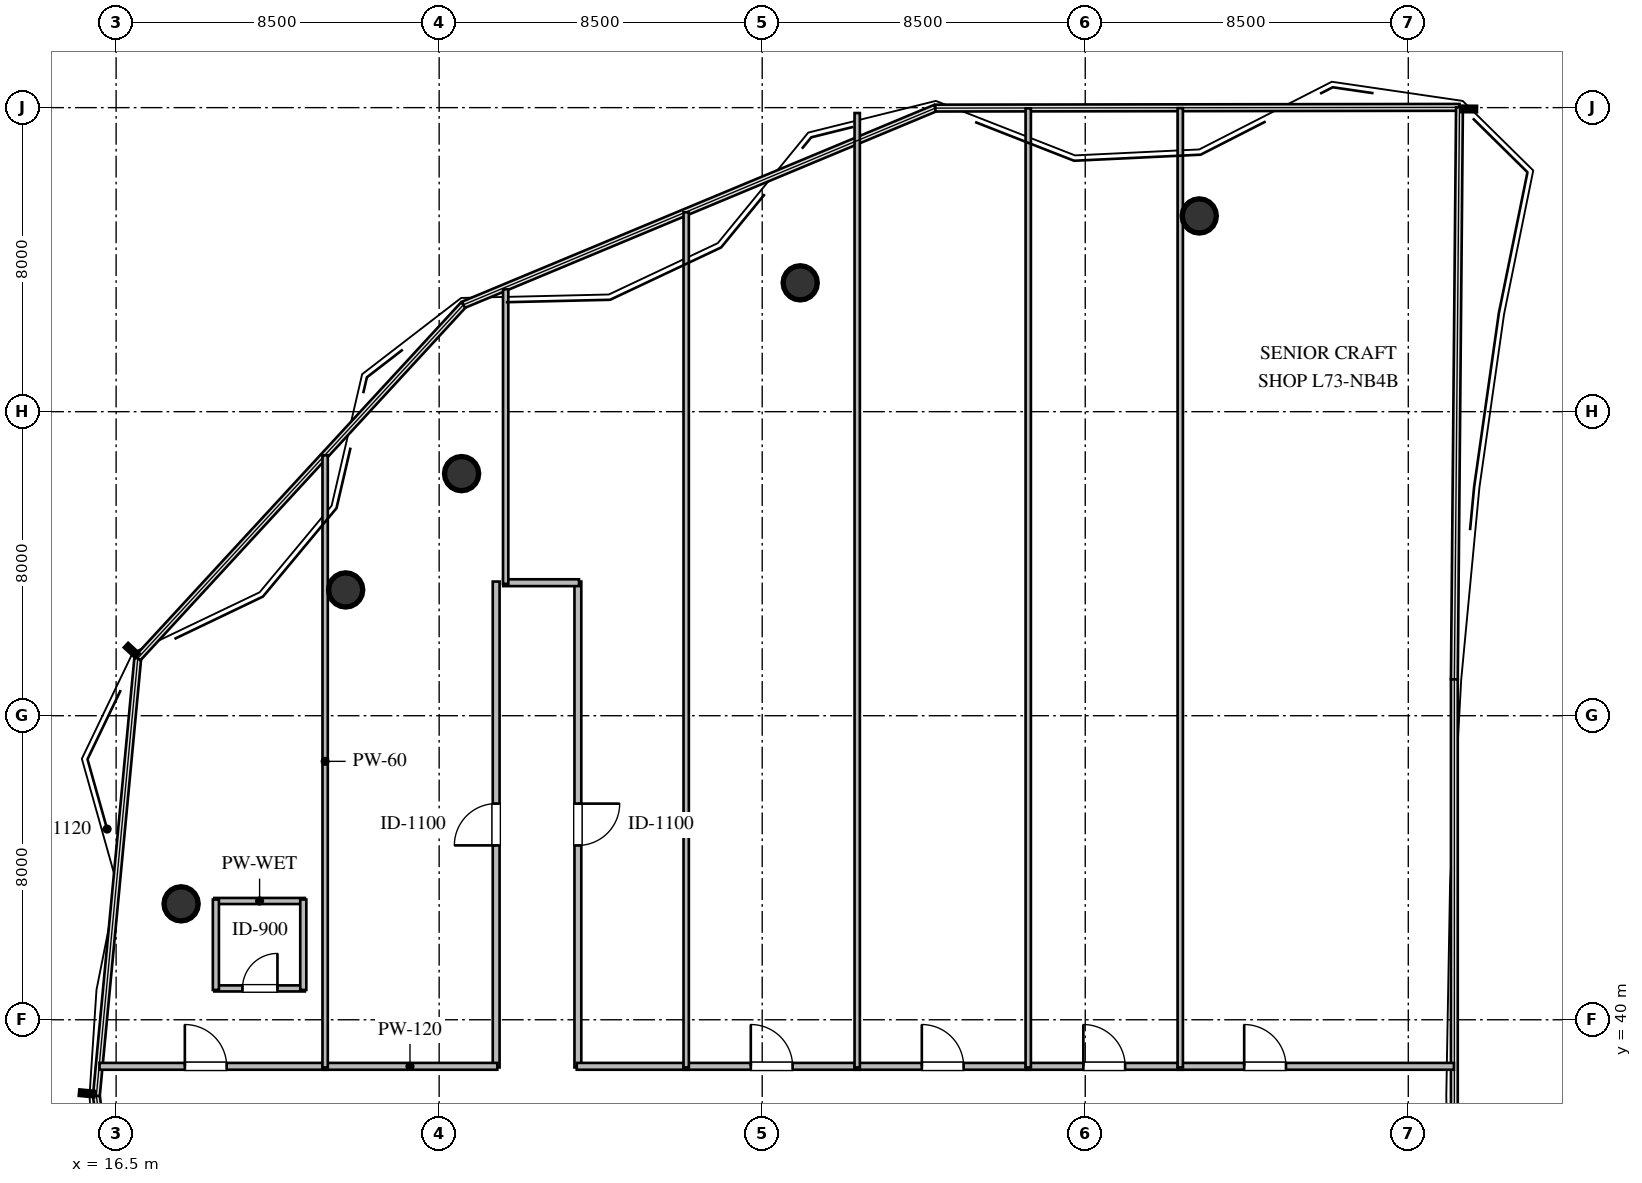
"""IFC4 building model, lengths in metres.
Left out: names, types, materials, properties, quantities, classifications, styles, units other than length and angle.
Written with IfcOpenShell. Run it as: python <this file> out.ifc"""

import sys

from ifc_helpers import new_model, si_unit, direction, frame, frame_2d, origin, origin_2d, place, context, subcontext, project, spatial, rectangle, circle, extrude, element, fill, save


model = new_model("IFC4")
c1 = context("Model", 3, precision=1e-05, world=origin(), true_north=direction((0.0, 1.0)))
c2 = subcontext(c1, "Body", "Model", "MODEL_VIEW")
j1 = project(units=[si_unit("LENGTHUNIT", "METRE"), si_unit("PLANEANGLEUNIT", "RADIAN")], contexts=[c1])
p1 = place(None, origin())
s1 = spatial("IfcSite", under=j1, at=p1, CompositionType="ELEMENT")
p2 = place(p1, origin())
s2 = spatial("IfcBuilding", under=s1, at=p2, CompositionType="ELEMENT")
p3 = place(p2, frame((0.0, 0.0, 277.6)))
s3 = spatial("IfcBuildingStorey", under=s2, at=p3, CompositionType="ELEMENT", Elevation=277.6)
for number, where, z_axis, x_axis in (
    (1, (45.0, 61.15, 0.0), (0.0, 0.0, 1.0), (1.0, 0.0, 0.0)),
    (2, (34.5, 59.39, 0.0), (0.0, 0.0, 1.0), (1.0, 0.0, 0.0)),
    (3, (25.59, 54.37, 0.0), (0.0, 0.0, 1.0), (1.0, 0.0, 0.0)),
    (4, (22.54, 51.31, 0.0), (0.0, 0.0, 1.0), (1.0, 0.0, 0.0)),
    (5, (18.21, 43.05, 0.0), (0.0, 0.0, 1.0), (1.0, 0.0, 0.0)),
):
    element("IfcColumn", number, at=place(p3, frame(where, z_axis=z_axis, x_axis=x_axis)), inside=s3, PredefinedType="COLUMN", context=c2, shape_type="SweptSolid", body=[
        extrude(circle(Radius=0.45, at=origin_2d()), origin(), (0.0, 0.0, 1.0), 3.8),
    ])
p4 = place(p3, frame((19.085, 40.825, 0.0), z_axis=(0.0, 0.0, 1.0), x_axis=(1.0, 0.0, 0.0)))
e6 = element("IfcWall", 6, at=p4, inside=s3, PredefinedType="PLUMBINGWALL", context=c2, shape_type="SweptSolid", body=[
    extrude(rectangle(XDim=2.38, YDim=0.16, at=frame_2d((1.19, 0.0))), origin(), (0.0, 0.0, 1.0), 3.48),
])
p5 = place(p4, frame((0.74, 0.0, 0.0)))
e7 = element("IfcOpeningElement", 7, at=p5, cuts=e6, PredefinedType="OPENING", context=c2, shape_type="SweptSolid", body=[
    extrude(rectangle(XDim=0.92, YDim=2.1, at=frame_2d((0.46, 1.05))), frame((0.0, 0.09, 0.0), z_axis=(0.0, -1.0, 0.0), x_axis=(1.0, 0.0, 0.0)), (0.0, 0.0, 1.0), 0.18),
])
p6 = place(p3, frame((19.085, 43.125, 0.0), z_axis=(0.0, 0.0, 1.0), x_axis=(1.0, 0.0, 0.0)))
e8 = element("IfcWall", 8, at=p6, inside=s3, PredefinedType="PLUMBINGWALL", context=c2, shape_type="SweptSolid", body=[
    extrude(rectangle(XDim=2.38, YDim=0.16, at=frame_2d((1.19, 0.0))), origin(), (0.0, 0.0, 1.0), 3.48),
])
p7 = place(p3, frame((19.125, 40.785, 0.0), z_axis=(0.0, 0.0, 1.0), x_axis=(0.0, 1.0, 0.0)))
e9 = element("IfcWall", 9, at=p7, inside=s3, PredefinedType="PLUMBINGWALL", context=c2, shape_type="SweptSolid", body=[
    extrude(rectangle(XDim=2.38, YDim=0.16, at=frame_2d((1.19, 0.0))), origin(), (0.0, 0.0, 1.0), 2.937),
])
p8 = place(p3, frame((21.425, 40.785, 0.0), z_axis=(0.0, 0.0, 1.0), x_axis=(0.0, 1.0, 0.0)))
e10 = element("IfcWall", 10, at=p8, inside=s3, PredefinedType="PLUMBINGWALL", context=c2, shape_type="SweptSolid", body=[
    extrude(rectangle(XDim=2.38, YDim=0.16, at=frame_2d((1.19, 0.0))), origin(), (0.0, 0.0, 1.0), 3.48),
])
p9 = place(p3, frame((16.063, 38.775, 0.0), z_axis=(0.0, 0.0, 1.0), x_axis=(1.0, 0.0, 0.0)))
e11 = element("IfcWall", 11, at=p9, inside=s3, PredefinedType="PARTITIONING", context=c2, shape_type="SweptSolid", body=[
    extrude(rectangle(XDim=6.001, YDim=0.18, at=frame_2d((3.001, 0.0))), origin(), (0.0, 0.0, 1.0), 3.48),
])
p10 = place(p9, frame((2.245, 0.0, 0.0)))
e12 = element("IfcOpeningElement", 12, at=p10, cuts=e11, PredefinedType="OPENING", context=c2, shape_type="SweptSolid", body=[
    extrude(rectangle(XDim=1.1, YDim=2.1, at=frame_2d((0.55, 1.05))), frame((0.0, 0.1, 0.0), z_axis=(0.0, -1.0, 0.0), x_axis=(1.0, 0.0, 0.0)), (0.0, 0.0, 1.0), 0.2),
])
p11 = place(p3, frame((26.5, 38.745, 0.0), z_axis=(0.0, 0.0, 1.0), x_axis=(0.0, 1.0, 0.0)))
e13 = element("IfcWall", 13, at=p11, inside=s3, PredefinedType="PARTITIONING", context=c2, shape_type="SweptSolid", body=[
    extrude(rectangle(XDim=12.785, YDim=0.18, at=frame_2d((6.393, 0.0))), origin(), (0.0, 0.0, 1.0), 3.48),
])
p12 = place(p11, frame((5.843, 0.0, 0.0)))
e14 = element("IfcOpeningElement", 14, at=p12, cuts=e13, PredefinedType="OPENING", context=c2, shape_type="SweptSolid", body=[
    extrude(rectangle(XDim=1.1, YDim=2.1, at=frame_2d((0.55, 1.05))), frame((0.0, 0.1, 0.0), z_axis=(0.0, -1.0, 0.0), x_axis=(1.0, 0.0, 0.0)), (0.0, 0.0, 1.0), 0.2),
])
p13 = place(p3, frame((21.935, 38.775, 0.0), z_axis=(0.0, 0.0, 1.0), x_axis=(1.0, 0.0, 0.0)))
e15 = element("IfcWall", 15, at=p13, inside=s3, PredefinedType="PARTITIONING", context=c2, shape_type="SweptSolid", body=[
    extrude(rectangle(XDim=4.595, YDim=0.18, at=frame_2d((2.297, 0.0))), origin(), (0.0, 0.0, 1.0), 3.48),
])
p14 = place(p3, frame((28.65, 51.53, 0.0), z_axis=(0.0, 0.0, 1.0), x_axis=(0.0, -1.0, 0.0)))
e16 = element("IfcWall", 16, at=p14, inside=s3, PredefinedType="PARTITIONING", context=c2, shape_type="SweptSolid", body=[
    extrude(rectangle(XDim=12.785, YDim=0.18, at=frame_2d((6.393, 0.0))), origin(), (0.0, 0.0, 1.0), 3.48),
])
p15 = place(p14, frame((5.843, 0.0, 0.0)))
e17 = element("IfcOpeningElement", 17, at=p15, cuts=e16, PredefinedType="OPENING", context=c2, shape_type="SweptSolid", body=[
    extrude(rectangle(XDim=1.1, YDim=2.1, at=frame_2d((0.55, 1.05))), frame((0.0, 0.1, 0.0), z_axis=(0.0, -1.0, 0.0), x_axis=(1.0, 0.0, 0.0)), (0.0, 0.0, 1.0), 0.2),
])
p16 = place(p3, frame((28.62, 38.775, 0.0), z_axis=(0.0, 0.0, 1.0), x_axis=(1.0, 0.0, 0.0)))
e18 = element("IfcWall", 18, at=p16, inside=s3, PredefinedType="PARTITIONING", context=c2, shape_type="SweptSolid", body=[
    extrude(rectangle(XDim=2.945, YDim=0.18, at=frame_2d((1.472, 0.0))), origin(), (0.0, 0.0, 1.0), 3.48),
])
p17 = place(p3, frame((26.685, 51.5, 0.0), z_axis=(0.0, 0.0, 1.0), x_axis=(1.0, 0.0, 0.0)))
e19 = element("IfcWall", 19, at=p17, inside=s3, PredefinedType="PARTITIONING", context=c2, shape_type="SweptSolid", body=[
    extrude(rectangle(XDim=1.995, YDim=0.18, at=frame_2d((0.998, 0.0))), origin(), (0.0, 0.0, 1.0), 3.48),
])
p18 = place(p3, frame((31.435, 38.775, 0.0), z_axis=(0.0, 0.0, 1.0), x_axis=(1.0, 0.0, 0.0)))
e20 = element("IfcWall", 20, at=p18, inside=s3, PredefinedType="PARTITIONING", context=c2, shape_type="SweptSolid", body=[
    extrude(rectangle(XDim=4.63, YDim=0.18, at=frame_2d((2.315, 0.0))), origin(), (0.0, 0.0, 1.0), 3.48),
])
p19 = place(p18, frame((1.765, 0.0, 0.0)))
e21 = element("IfcOpeningElement", 21, at=p19, cuts=e20, PredefinedType="OPENING", context=c2, shape_type="SweptSolid", body=[
    extrude(rectangle(XDim=1.1, YDim=2.1, at=frame_2d((0.55, 1.05))), frame((0.0, 0.1, 0.0), z_axis=(0.0, -1.0, 0.0), x_axis=(1.0, 0.0, 0.0)), (0.0, 0.0, 1.0), 0.2),
])
p20 = place(p3, frame((35.935, 38.775, 0.0), z_axis=(0.0, 0.0, 1.0), x_axis=(1.0, 0.0, 0.0)))
e22 = element("IfcWall", 22, at=p20, inside=s3, PredefinedType="PARTITIONING", context=c2, shape_type="SweptSolid", body=[
    extrude(rectangle(XDim=4.63, YDim=0.18, at=frame_2d((2.315, 0.0))), origin(), (0.0, 0.0, 1.0), 3.48),
])
p21 = place(p20, frame((1.765, 0.0, 0.0)))
e23 = element("IfcOpeningElement", 23, at=p21, cuts=e22, PredefinedType="OPENING", context=c2, shape_type="SweptSolid", body=[
    extrude(rectangle(XDim=1.1, YDim=2.1, at=frame_2d((0.55, 1.05))), frame((0.0, 0.1, 0.0), z_axis=(0.0, -1.0, 0.0), x_axis=(1.0, 0.0, 0.0)), (0.0, 0.0, 1.0), 0.2),
])
p22 = place(p3, frame((40.435, 38.775, 0.0), z_axis=(0.0, 0.0, 1.0), x_axis=(1.0, 0.0, 0.0)))
e24 = element("IfcWall", 24, at=p22, inside=s3, PredefinedType="PARTITIONING", context=c2, shape_type="SweptSolid", body=[
    extrude(rectangle(XDim=4.13, YDim=0.18, at=frame_2d((2.065, 0.0))), origin(), (0.0, 0.0, 1.0), 3.48),
])
p23 = place(p22, frame((1.515, 0.0, 0.0)))
e25 = element("IfcOpeningElement", 25, at=p23, cuts=e24, PredefinedType="OPENING", context=c2, shape_type="SweptSolid", body=[
    extrude(rectangle(XDim=1.1, YDim=2.1, at=frame_2d((0.55, 1.05))), frame((0.0, 0.1, 0.0), z_axis=(0.0, -1.0, 0.0), x_axis=(1.0, 0.0, 0.0)), (0.0, 0.0, 1.0), 0.2),
])
p24 = place(p3, frame((44.435, 38.775, 0.0), z_axis=(0.0, 0.0, 1.0), x_axis=(1.0, 0.0, 0.0)))
e26 = element("IfcWall", 26, at=p24, inside=s3, PredefinedType="PARTITIONING", context=c2, shape_type="SweptSolid", body=[
    extrude(rectangle(XDim=7.267, YDim=0.18, at=frame_2d((3.633, 0.0))), origin(), (0.0, 0.0, 1.0), 3.48),
])
p25 = place(p24, frame((1.747, 0.0, 0.0)))
e27 = element("IfcOpeningElement", 27, at=p25, cuts=e26, PredefinedType="OPENING", context=c2, shape_type="SweptSolid", body=[
    extrude(rectangle(XDim=1.1, YDim=2.1, at=frame_2d((0.55, 1.05))), frame((0.0, 0.1, 0.0), z_axis=(0.0, -1.0, 0.0), x_axis=(1.0, 0.0, 0.0)), (0.0, 0.0, 1.0), 0.2),
])
p26 = place(p3, frame((22.0, 54.854, 0.0), z_axis=(0.0, 0.0, 1.0), x_axis=(0.0, -1.0, 0.0)))
e28 = element("IfcWall", 28, at=p26, inside=s3, PredefinedType="PARTITIONING", context=c2, shape_type="SweptSolid", body=[
    extrude(rectangle(XDim=16.109, YDim=0.14, at=frame_2d((8.054, 0.0))), origin(), (0.0, 0.0, 1.0), 3.01),
])
p27 = place(p3, frame((26.75, 59.22, 0.0), z_axis=(0.0, 0.0, 1.0), x_axis=(0.0, -1.0, 0.0)))
e29 = element("IfcWall", 29, at=p27, inside=s3, PredefinedType="PARTITIONING", context=c2, shape_type="SweptSolid", body=[
    extrude(rectangle(XDim=7.75, YDim=0.14, at=frame_2d((3.875, 0.0))), origin(), (0.0, 0.0, 1.0), 3.48),
])
p28 = place(p3, frame((31.5, 61.246, 0.0), z_axis=(0.0, 0.0, 1.0), x_axis=(0.0, -1.0, 0.0)))
e30 = element("IfcWall", 30, at=p28, inside=s3, PredefinedType="PARTITIONING", context=c2, shape_type="SweptSolid", body=[
    extrude(rectangle(XDim=22.501, YDim=0.14, at=frame_2d((11.25, 0.0))), origin(), (0.0, 0.0, 1.0), 3.48),
])
p29 = place(p3, frame((36.0, 63.858, 0.0), z_axis=(0.0, 0.0, 1.0), x_axis=(0.0, -1.0, 0.0)))
e31 = element("IfcWall", 31, at=p29, inside=s3, PredefinedType="PARTITIONING", context=c2, shape_type="SweptSolid", body=[
    extrude(rectangle(XDim=25.113, YDim=0.14, at=frame_2d((12.556, 0.0))), origin(), (0.0, 0.0, 1.0), 3.01),
])
p30 = place(p3, frame((40.5, 63.981, 0.0), z_axis=(0.0, 0.0, 1.0), x_axis=(0.0, -1.0, 0.0)))
e32 = element("IfcWall", 32, at=p30, inside=s3, PredefinedType="PARTITIONING", context=c2, shape_type="SweptSolid", body=[
    extrude(rectangle(XDim=25.236, YDim=0.14, at=frame_2d((12.618, 0.0))), origin(), (0.0, 0.0, 1.0), 3.48),
])
p31 = place(p3, frame((44.5, 63.987, 0.0), z_axis=(0.0, 0.0, 1.0), x_axis=(0.0, -1.0, 0.0)))
e33 = element("IfcWall", 33, at=p31, inside=s3, PredefinedType="PARTITIONING", context=c2, shape_type="SweptSolid", body=[
    extrude(rectangle(XDim=25.242, YDim=0.14, at=frame_2d((12.621, 0.0))), origin(), (0.0, 0.0, 1.0), 3.01),
])
p32 = place(p5, origin())
e34 = element("IfcDoor", 34, at=p32, inside=s3, OperationType="SINGLE_SWING_RIGHT", PredefinedType="DOOR", context=c2, shape_type="SweptSolid", body=[
    extrude(rectangle(XDim=0.92, YDim=2.1, at=frame_2d((0.46, 1.05))), frame((0.0, 0.025, 0.0), z_axis=(0.0, -1.0, 0.0), x_axis=(1.0, 0.0, 0.0)), (0.0, 0.0, 1.0), 0.05),
])
fill(e7, e34)
p33 = place(p10, origin())
e35 = element("IfcDoor", 35, at=p33, inside=s3, OperationType="SINGLE_SWING_LEFT", PredefinedType="DOOR", context=c2, shape_type="SweptSolid", body=[
    extrude(rectangle(XDim=1.1, YDim=2.1, at=frame_2d((0.55, 1.05))), frame((0.0, 0.025, 0.0), z_axis=(0.0, -1.0, 0.0), x_axis=(1.0, 0.0, 0.0)), (0.0, 0.0, 1.0), 0.05),
])
fill(e12, e35)
p34 = place(p12, origin())
e36 = element("IfcDoor", 36, at=p34, inside=s3, OperationType="SINGLE_SWING_LEFT", PredefinedType="DOOR", context=c2, shape_type="SweptSolid", body=[
    extrude(rectangle(XDim=1.1, YDim=2.1, at=frame_2d((0.55, 1.05))), frame((0.0, 0.025, 0.0), z_axis=(0.0, -1.0, 0.0), x_axis=(1.0, 0.0, 0.0)), (0.0, 0.0, 1.0), 0.05),
])
fill(e14, e36)
p35 = place(p15, origin())
e37 = element("IfcDoor", 37, at=p35, inside=s3, OperationType="SINGLE_SWING_LEFT", PredefinedType="DOOR", context=c2, shape_type="SweptSolid", body=[
    extrude(rectangle(XDim=1.1, YDim=2.1, at=frame_2d((0.55, 1.05))), frame((0.0, 0.025, 0.0), z_axis=(0.0, -1.0, 0.0), x_axis=(1.0, 0.0, 0.0)), (0.0, 0.0, 1.0), 0.05),
])
fill(e17, e37)
p36 = place(p19, origin())
e38 = element("IfcDoor", 38, at=p36, inside=s3, OperationType="SINGLE_SWING_LEFT", PredefinedType="DOOR", context=c2, shape_type="SweptSolid", body=[
    extrude(rectangle(XDim=1.1, YDim=2.1, at=frame_2d((0.55, 1.05))), frame((0.0, 0.025, 0.0), z_axis=(0.0, -1.0, 0.0), x_axis=(1.0, 0.0, 0.0)), (0.0, 0.0, 1.0), 0.05),
])
fill(e21, e38)
p37 = place(p21, origin())
e39 = element("IfcDoor", 39, at=p37, inside=s3, OperationType="SINGLE_SWING_LEFT", PredefinedType="DOOR", context=c2, shape_type="SweptSolid", body=[
    extrude(rectangle(XDim=1.1, YDim=2.1, at=frame_2d((0.55, 1.05))), frame((0.0, 0.025, 0.0), z_axis=(0.0, -1.0, 0.0), x_axis=(1.0, 0.0, 0.0)), (0.0, 0.0, 1.0), 0.05),
])
fill(e23, e39)
p38 = place(p23, origin())
e40 = element("IfcDoor", 40, at=p38, inside=s3, OperationType="SINGLE_SWING_LEFT", PredefinedType="DOOR", context=c2, shape_type="SweptSolid", body=[
    extrude(rectangle(XDim=1.1, YDim=2.1, at=frame_2d((0.55, 1.05))), frame((0.0, 0.025, 0.0), z_axis=(0.0, -1.0, 0.0), x_axis=(1.0, 0.0, 0.0)), (0.0, 0.0, 1.0), 0.05),
])
fill(e25, e40)
p39 = place(p25, origin())
e41 = element("IfcDoor", 41, at=p39, inside=s3, OperationType="SINGLE_SWING_LEFT", PredefinedType="DOOR", context=c2, shape_type="SweptSolid", body=[
    extrude(rectangle(XDim=1.1, YDim=2.1, at=frame_2d((0.55, 1.05))), frame((0.0, 0.025, 0.0), z_axis=(0.0, -1.0, 0.0), x_axis=(1.0, 0.0, 0.0)), (0.0, 0.0, 1.0), 0.05),
])
fill(e27, e41)
save(model, sys.argv[1])
